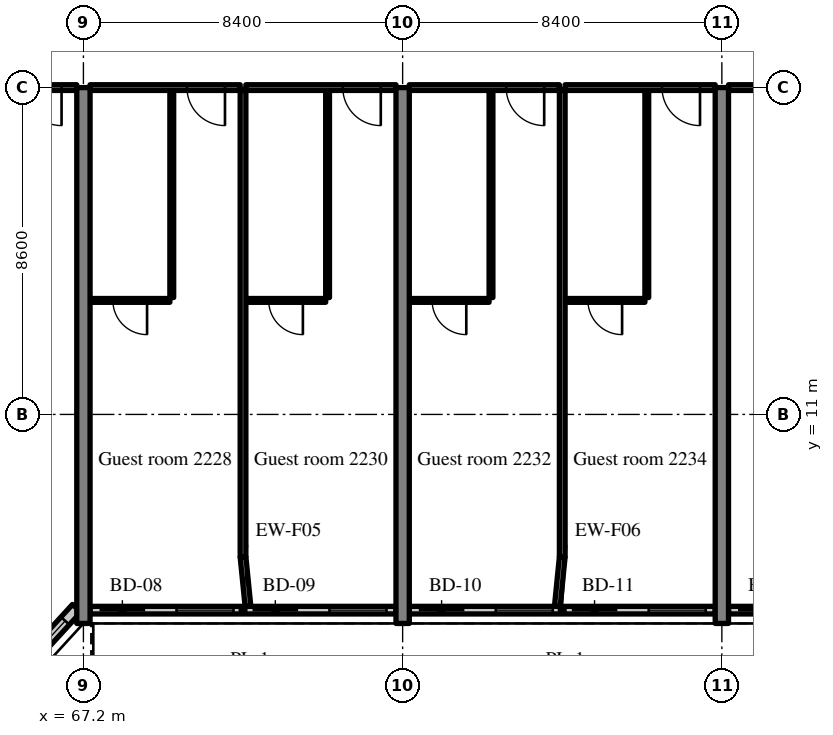
"""IFC4 building model, lengths in metres.
Left out: names, types, materials, properties, quantities, classifications, styles, units other than length and angle.
Written with IfcOpenShell. Run it as: python <this file> out.ifc"""

import sys

from ifc_helpers import new_model, si_unit, direction, frame, frame_2d, origin, place, context, subcontext, project, spatial, rectangle, extrude, source, transform, mapped, element, fill, save


model = new_model("IFC4")
c1 = context("Model", 3, precision=1e-05, world=origin(), true_north=direction((0.0, 1.0)))
c2 = subcontext(c1, "Body", "Model", "MODEL_VIEW")
j1 = project(units=[si_unit("LENGTHUNIT", "METRE"), si_unit("PLANEANGLEUNIT", "RADIAN")], contexts=[c1])
p1 = place(None, origin())
s1 = spatial("IfcSite", under=j1, at=p1, CompositionType="ELEMENT")
p2 = place(p1, origin())
s2 = spatial("IfcBuilding", under=s1, at=p2, CompositionType="ELEMENT")
p3 = place(p2, frame((0.0, 0.0, 95.2)))
s3 = spatial("IfcBuildingStorey", under=s2, at=p3, CompositionType="ELEMENT", Elevation=95.2)
m1 = source(origin(), c2, "Body", "SweptSolid", [
    extrude(rectangle(XDim=14.1, YDim=0.35, at=frame_2d((7.05, 0.0))), origin(), (0.0, 0.0, 1.0), 3.52),
])
for number, where, z_axis, x_axis in (
    (1, (67.2, 5.5, 0.0), (0.0, 0.0, 1.0), (0.0, 1.0, 0.0)),
    (2, (75.6, 5.5, 0.0), (0.0, 0.0, 1.0), (0.0, 1.0, 0.0)),
    (3, (84.0, 5.5, 0.0), (0.0, 0.0, 1.0), (0.0, 1.0, 0.0)),
):
    element("IfcWall", number, at=place(p3, frame(where, z_axis=z_axis, x_axis=x_axis)), inside=s3, PredefinedType="SHEAR", context=c2, shape_type="MappedRepresentation", body=[
        mapped(m1, transform((0.0, 0.0, 0.0), scale=1.0)),
    ])
m2 = source(origin(), c2, "Body", "SweptSolid", [
    extrude(rectangle(XDim=2.398, YDim=0.3, at=frame_2d((1.199, 0.0))), origin(), (0.0, 0.0, 1.0), 3.52),
])
p4 = place(p3, frame((65.404, 4.131, 0.0), z_axis=(0.0, 0.0, 1.0), x_axis=(0.675374189419, 0.737475222815, 0.0)))
e4 = element("IfcWall", 4, at=p4, inside=s3, PredefinedType="SOLIDWALL", context=c2, shape_type="MappedRepresentation", body=[
    mapped(m2, transform((0.0, 0.0, 0.0), scale=1.0)),
])
m3 = source(origin(), c2, "Body", "SweptSolid", [
    extrude(rectangle(XDim=1.5, YDim=2.0, at=frame_2d((0.75, 1.0))), frame((0.0, 0.16, 0.0), z_axis=(0.0, -1.0, 0.0), x_axis=(1.0, 0.0, 0.0)), (0.0, 0.0, 1.0), 0.32),
])
p5 = place(p4, frame((0.449, 0.0, 0.9)))
e5 = element("IfcOpeningElement", 5, at=p5, cuts=e4, PredefinedType="OPENING", context=c2, shape_type="MappedRepresentation", body=[
    mapped(m3, transform((0.0, 0.0, 0.0), scale=1.0)),
])
m4 = source(origin(), c2, "Body", "SweptSolid", [
    extrude(rectangle(XDim=8.05, YDim=0.2, at=frame_2d((4.025, 0.0))), origin(), (0.0, 0.0, 1.0), 2.82),
])
p6 = place(p3, frame((67.375, 5.85, 0.0), z_axis=(0.0, 0.0, 1.0), x_axis=(1.0, 0.0, 0.0)))
e6 = element("IfcWall", 6, at=p6, inside=s3, PredefinedType="SOLIDWALL", context=c2, shape_type="MappedRepresentation", body=[
    mapped(m4, transform((0.0, 0.0, 0.0), scale=1.0)),
])
m5 = source(origin(), c2, "Body", "SweptSolid", [
    extrude(rectangle(XDim=1.2, YDim=2.4, at=frame_2d((0.6, 1.2))), frame((0.0, 0.11, 0.0), z_axis=(0.0, -1.0, 0.0), x_axis=(1.0, 0.0, 0.0)), (0.0, 0.0, 1.0), 0.22),
])
p7 = place(p6, frame((0.25, 0.0, 0.0)))
e7 = element("IfcOpeningElement", 7, at=p7, cuts=e6, PredefinedType="OPENING", context=c2, shape_type="MappedRepresentation", body=[
    mapped(m5, transform((0.0, 0.0, 0.0), scale=1.0)),
])
m6 = source(origin(), c2, "Body", "SweptSolid", [
    extrude(rectangle(XDim=1.5, YDim=1.5, at=frame_2d((0.75, 0.75))), frame((0.0, 0.11, 0.0), z_axis=(0.0, -1.0, 0.0), x_axis=(1.0, 0.0, 0.0)), (0.0, 0.0, 1.0), 0.22),
])
p8 = place(p6, frame((2.275, 0.0, 0.9)))
e8 = element("IfcOpeningElement", 8, at=p8, cuts=e6, PredefinedType="OPENING", context=c2, shape_type="MappedRepresentation", body=[
    mapped(m6, transform((0.0, 0.0, 0.0), scale=1.0)),
])
p9 = place(p6, frame((4.275, 0.0, 0.0)))
e9 = element("IfcOpeningElement", 9, at=p9, cuts=e6, PredefinedType="OPENING", context=c2, shape_type="MappedRepresentation", body=[
    mapped(m5, transform((0.0, 0.0, 0.0), scale=1.0)),
])
p10 = place(p6, frame((6.3, 0.0, 0.9)))
e10 = element("IfcOpeningElement", 10, at=p10, cuts=e6, PredefinedType="OPENING", context=c2, shape_type="MappedRepresentation", body=[
    mapped(m6, transform((0.0, 0.0, 0.0), scale=1.0)),
])
p11 = place(p3, frame((75.775, 5.85, 0.0), z_axis=(0.0, 0.0, 1.0), x_axis=(1.0, 0.0, 0.0)))
e11 = element("IfcWall", 11, at=p11, inside=s3, PredefinedType="SOLIDWALL", context=c2, shape_type="MappedRepresentation", body=[
    mapped(m4, transform((0.0, 0.0, 0.0), scale=1.0)),
])
p12 = place(p11, frame((0.25, 0.0, 0.0)))
e12 = element("IfcOpeningElement", 12, at=p12, cuts=e11, PredefinedType="OPENING", context=c2, shape_type="MappedRepresentation", body=[
    mapped(m5, transform((0.0, 0.0, 0.0), scale=1.0)),
])
p13 = place(p11, frame((2.275, 0.0, 0.9)))
e13 = element("IfcOpeningElement", 13, at=p13, cuts=e11, PredefinedType="OPENING", context=c2, shape_type="MappedRepresentation", body=[
    mapped(m6, transform((0.0, 0.0, 0.0), scale=1.0)),
])
p14 = place(p11, frame((4.275, 0.0, 0.0)))
e14 = element("IfcOpeningElement", 14, at=p14, cuts=e11, PredefinedType="OPENING", context=c2, shape_type="MappedRepresentation", body=[
    mapped(m5, transform((0.0, 0.0, 0.0), scale=1.0)),
])
p15 = place(p11, frame((6.3, 0.0, 0.9)))
e15 = element("IfcOpeningElement", 15, at=p15, cuts=e11, PredefinedType="OPENING", context=c2, shape_type="MappedRepresentation", body=[
    mapped(m6, transform((0.0, 0.0, 0.0), scale=1.0)),
])
p16 = place(p3, frame((84.175, 5.85, 0.0), z_axis=(0.0, 0.0, 1.0), x_axis=(1.0, 0.0, 0.0)))
e16 = element("IfcWall", 16, at=p16, inside=s3, PredefinedType="SOLIDWALL", context=c2, shape_type="MappedRepresentation", body=[
    mapped(m4, transform((0.0, 0.0, 0.0), scale=1.0)),
])
p17 = place(p16, frame((0.25, 0.0, 0.0)))
e17 = element("IfcOpeningElement", 17, at=p17, cuts=e16, PredefinedType="OPENING", context=c2, shape_type="MappedRepresentation", body=[
    mapped(m5, transform((0.0, 0.0, 0.0), scale=1.0)),
])
p18 = place(p16, frame((2.275, 0.0, 0.9)))
e18 = element("IfcOpeningElement", 18, at=p18, cuts=e16, PredefinedType="OPENING", context=c2, shape_type="MappedRepresentation", body=[
    mapped(m6, transform((0.0, 0.0, 0.0), scale=1.0)),
])
p19 = place(p16, frame((4.275, 0.0, 0.0)))
e19 = element("IfcOpeningElement", 19, at=p19, cuts=e16, PredefinedType="OPENING", context=c2, shape_type="MappedRepresentation", body=[
    mapped(m5, transform((0.0, 0.0, 0.0), scale=1.0)),
])
p20 = place(p16, frame((6.3, 0.0, 0.9)))
e20 = element("IfcOpeningElement", 20, at=p20, cuts=e16, PredefinedType="OPENING", context=c2, shape_type="MappedRepresentation", body=[
    mapped(m6, transform((0.0, 0.0, 0.0), scale=1.0)),
])
m7 = source(origin(), c2, "Body", "SweptSolid", [
    extrude(rectangle(XDim=8.05, YDim=0.15, at=frame_2d((4.025, 0.0))), origin(), (0.0, 0.0, 1.0), 2.82),
])
p21 = place(p3, frame((58.975, 19.6, 0.0), z_axis=(0.0, 0.0, 1.0), x_axis=(1.0, 0.0, 0.0)))
e21 = element("IfcWall", 21, at=p21, inside=s3, PredefinedType="PARTITIONING", context=c2, shape_type="MappedRepresentation", body=[
    mapped(m7, transform((0.0, 0.0, 0.0), scale=1.0)),
])
m8 = source(origin(), c2, "Body", "SweptSolid", [
    extrude(rectangle(XDim=1.0, YDim=2.1, at=frame_2d((0.5, 1.05))), frame((0.0, 0.085, 0.0), z_axis=(0.0, -1.0, 0.0), x_axis=(1.0, 0.0, 0.0)), (0.0, 0.0, 1.0), 0.17),
])
p22 = place(p21, frame((6.65, 0.0, 0.0)))
e22 = element("IfcOpeningElement", 22, at=p22, cuts=e21, PredefinedType="OPENING", context=c2, shape_type="MappedRepresentation", body=[
    mapped(m8, transform((0.0, 0.0, 0.0), scale=1.0)),
])
m9 = source(origin(), c2, "Body", "SweptSolid", [
    extrude(rectangle(XDim=5.45, YDim=0.1, at=frame_2d((2.725, 0.0))), origin(), (0.0, 0.0, 1.0), 3.52),
])
p23 = place(p3, frame((69.525, 14.075, 0.0), z_axis=(0.0, 0.0, 1.0), x_axis=(0.0, 1.0, 0.0)))
e23 = element("IfcWall", 23, at=p23, inside=s3, PredefinedType="PARTITIONING", context=c2, shape_type="MappedRepresentation", body=[
    mapped(m9, transform((0.0, 0.0, 0.0), scale=1.0)),
])
m10 = source(origin(), c2, "Body", "SweptSolid", [
    extrude(rectangle(XDim=2.1, YDim=0.1, at=frame_2d((1.05, 0.0))), origin(), (0.0, 0.0, 1.0), 3.52),
])
p24 = place(p3, frame((67.375, 14.0, 0.0), z_axis=(0.0, 0.0, 1.0), x_axis=(1.0, 0.0, 0.0)))
e24 = element("IfcWall", 24, at=p24, inside=s3, PredefinedType="PARTITIONING", context=c2, shape_type="MappedRepresentation", body=[
    mapped(m10, transform((0.0, 0.0, 0.0), scale=1.0)),
])
m11 = source(origin(), c2, "Body", "SweptSolid", [
    extrude(rectangle(XDim=0.9, YDim=2.1, at=frame_2d((0.45, 1.05))), frame((0.0, 0.06, 0.0), z_axis=(0.0, -1.0, 0.0), x_axis=(1.0, 0.0, 0.0)), (0.0, 0.0, 1.0), 0.12),
])
p25 = place(p24, frame((0.6, 0.0, 0.0)))
e25 = element("IfcOpeningElement", 25, at=p25, cuts=e24, PredefinedType="OPENING", context=c2, shape_type="MappedRepresentation", body=[
    mapped(m11, transform((0.0, 0.0, 0.0), scale=1.0)),
])
m12 = source(origin(), c2, "Body", "SweptSolid", [
    extrude(rectangle(XDim=3.95, YDim=0.15, at=frame_2d((1.975, 0.0))), origin(), (0.0, 0.0, 1.0), 2.82),
])
p26 = place(p3, frame((67.375, 19.6, 0.0), z_axis=(0.0, 0.0, 1.0), x_axis=(1.0, 0.0, 0.0)))
e26 = element("IfcWall", 26, at=p26, inside=s3, PredefinedType="PARTITIONING", context=c2, shape_type="MappedRepresentation", body=[
    mapped(m12, transform((0.0, 0.0, 0.0), scale=1.0)),
])
p27 = place(p26, frame((2.55, 0.0, 0.0)))
e27 = element("IfcOpeningElement", 27, at=p27, cuts=e26, PredefinedType="OPENING", context=c2, shape_type="MappedRepresentation", body=[
    mapped(m8, transform((0.0, 0.0, 0.0), scale=1.0)),
])
p28 = place(p3, frame((73.625, 14.075, 0.0), z_axis=(0.0, 0.0, 1.0), x_axis=(0.0, 1.0, 0.0)))
e28 = element("IfcWall", 28, at=p28, inside=s3, PredefinedType="PARTITIONING", context=c2, shape_type="MappedRepresentation", body=[
    mapped(m9, transform((0.0, 0.0, 0.0), scale=1.0)),
])
m13 = source(origin(), c2, "Body", "SweptSolid", [
    extrude(rectangle(XDim=2.1, YDim=0.1, at=frame_2d((1.05, 0.0))), origin(), (0.0, 0.0, 1.0), 3.52),
])
p29 = place(p3, frame((71.475, 14.0, 0.0), z_axis=(0.0, 0.0, 1.0), x_axis=(1.0, 0.0, 0.0)))
e29 = element("IfcWall", 29, at=p29, inside=s3, PredefinedType="PARTITIONING", context=c2, shape_type="MappedRepresentation", body=[
    mapped(m13, transform((0.0, 0.0, 0.0), scale=1.0)),
])
p30 = place(p29, frame((0.6, 0.0, 0.0)))
e30 = element("IfcOpeningElement", 30, at=p30, cuts=e29, PredefinedType="OPENING", context=c2, shape_type="MappedRepresentation", body=[
    mapped(m11, transform((0.0, 0.0, 0.0), scale=1.0)),
])
p31 = place(p3, frame((71.475, 19.6, 0.0), z_axis=(0.0, 0.0, 1.0), x_axis=(1.0, 0.0, 0.0)))
e31 = element("IfcWall", 31, at=p31, inside=s3, PredefinedType="PARTITIONING", context=c2, shape_type="MappedRepresentation", body=[
    mapped(m12, transform((0.0, 0.0, 0.0), scale=1.0)),
])
p32 = place(p31, frame((2.55, 0.0, 0.0)))
e32 = element("IfcOpeningElement", 32, at=p32, cuts=e31, PredefinedType="OPENING", context=c2, shape_type="MappedRepresentation", body=[
    mapped(m8, transform((0.0, 0.0, 0.0), scale=1.0)),
])
m14 = source(origin(), c2, "Body", "SweptSolid", [
    extrude(rectangle(XDim=12.275, YDim=0.15, at=frame_2d((6.137, 0.0))), origin(), (0.0, 0.0, 1.0), 3.52),
])
p33 = place(p3, frame((71.4, 7.25, 0.0), z_axis=(0.0, 0.0, 1.0), x_axis=(0.0, 1.0, 0.0)))
e33 = element("IfcWall", 33, at=p33, inside=s3, PredefinedType="PARTITIONING", context=c2, shape_type="MappedRepresentation", body=[
    mapped(m14, transform((0.0, 0.0, 0.0), scale=1.0)),
])
p34 = place(p3, frame((77.925, 14.075, 0.0), z_axis=(0.0, 0.0, 1.0), x_axis=(0.0, 1.0, 0.0)))
e34 = element("IfcWall", 34, at=p34, inside=s3, PredefinedType="PARTITIONING", context=c2, shape_type="MappedRepresentation", body=[
    mapped(m9, transform((0.0, 0.0, 0.0), scale=1.0)),
])
p35 = place(p3, frame((75.775, 14.0, 0.0), z_axis=(0.0, 0.0, 1.0), x_axis=(1.0, 0.0, 0.0)))
e35 = element("IfcWall", 35, at=p35, inside=s3, PredefinedType="PARTITIONING", context=c2, shape_type="MappedRepresentation", body=[
    mapped(m10, transform((0.0, 0.0, 0.0), scale=1.0)),
])
p36 = place(p35, frame((0.6, 0.0, 0.0)))
e36 = element("IfcOpeningElement", 36, at=p36, cuts=e35, PredefinedType="OPENING", context=c2, shape_type="MappedRepresentation", body=[
    mapped(m11, transform((0.0, 0.0, 0.0), scale=1.0)),
])
m15 = source(origin(), c2, "Body", "SweptSolid", [
    extrude(rectangle(XDim=3.95, YDim=0.15, at=frame_2d((1.975, 0.0))), origin(), (0.0, 0.0, 1.0), 2.82),
])
p37 = place(p3, frame((75.775, 19.6, 0.0), z_axis=(0.0, 0.0, 1.0), x_axis=(1.0, 0.0, 0.0)))
e37 = element("IfcWall", 37, at=p37, inside=s3, PredefinedType="PARTITIONING", context=c2, shape_type="MappedRepresentation", body=[
    mapped(m15, transform((0.0, 0.0, 0.0), scale=1.0)),
])
p38 = place(p37, frame((2.55, 0.0, 0.0)))
e38 = element("IfcOpeningElement", 38, at=p38, cuts=e37, PredefinedType="OPENING", context=c2, shape_type="MappedRepresentation", body=[
    mapped(m8, transform((0.0, 0.0, 0.0), scale=1.0)),
])
p39 = place(p3, frame((82.025, 14.075, 0.0), z_axis=(0.0, 0.0, 1.0), x_axis=(0.0, 1.0, 0.0)))
e39 = element("IfcWall", 39, at=p39, inside=s3, PredefinedType="PARTITIONING", context=c2, shape_type="MappedRepresentation", body=[
    mapped(m9, transform((0.0, 0.0, 0.0), scale=1.0)),
])
p40 = place(p3, frame((79.875, 14.0, 0.0), z_axis=(0.0, 0.0, 1.0), x_axis=(1.0, 0.0, 0.0)))
e40 = element("IfcWall", 40, at=p40, inside=s3, PredefinedType="PARTITIONING", context=c2, shape_type="MappedRepresentation", body=[
    mapped(m10, transform((0.0, 0.0, 0.0), scale=1.0)),
])
p41 = place(p40, frame((0.6, 0.0, 0.0)))
e41 = element("IfcOpeningElement", 41, at=p41, cuts=e40, PredefinedType="OPENING", context=c2, shape_type="MappedRepresentation", body=[
    mapped(m11, transform((0.0, 0.0, 0.0), scale=1.0)),
])
p42 = place(p3, frame((79.875, 19.6, 0.0), z_axis=(0.0, 0.0, 1.0), x_axis=(1.0, 0.0, 0.0)))
e42 = element("IfcWall", 42, at=p42, inside=s3, PredefinedType="PARTITIONING", context=c2, shape_type="MappedRepresentation", body=[
    mapped(m12, transform((0.0, 0.0, 0.0), scale=1.0)),
])
p43 = place(p42, frame((2.55, 0.0, 0.0)))
e43 = element("IfcOpeningElement", 43, at=p43, cuts=e42, PredefinedType="OPENING", context=c2, shape_type="MappedRepresentation", body=[
    mapped(m8, transform((0.0, 0.0, 0.0), scale=1.0)),
])
p44 = place(p3, frame((79.8, 7.25, 0.0), z_axis=(0.0, 0.0, 1.0), x_axis=(0.0, 1.0, 0.0)))
e44 = element("IfcWall", 44, at=p44, inside=s3, PredefinedType="PARTITIONING", context=c2, shape_type="MappedRepresentation", body=[
    mapped(m14, transform((0.0, 0.0, 0.0), scale=1.0)),
])
p45 = place(p3, frame((84.175, 19.6, 0.0), z_axis=(0.0, 0.0, 1.0), x_axis=(1.0, 0.0, 0.0)))
e45 = element("IfcWall", 45, at=p45, inside=s3, PredefinedType="PARTITIONING", context=c2, shape_type="MappedRepresentation", body=[
    mapped(m12, transform((0.0, 0.0, 0.0), scale=1.0)),
])
p46 = place(p45, frame((1.475, 0.0, 0.0)))
e46 = element("IfcOpeningElement", 46, at=p46, cuts=e45, PredefinedType="OPENING", context=c2, shape_type="MappedRepresentation", body=[
    mapped(m8, transform((0.0, 0.0, 0.0), scale=1.0)),
])
m16 = source(origin(), c2, "Body", "SweptSolid", [
    extrude(rectangle(XDim=1.307, YDim=0.15, at=frame_2d((0.653, 0.0))), origin(), (0.0, 0.0, 1.0), 3.52),
])
for number, where, z_axis, x_axis in (
    (47, (71.53, 5.95, 0.0), (0.0, 0.0, 1.0), (-0.1, 0.995, 0.0)),
    (48, (79.67, 5.95, 0.0), (0.0, 0.0, 1.0), (0.1, 0.995, 0.0)),
):
    element("IfcWall", number, at=place(p3, frame(where, z_axis=z_axis, x_axis=x_axis)), inside=s3, PredefinedType="PARTITIONING", context=c2, shape_type="MappedRepresentation", body=[
        mapped(m16, transform((0.0, 0.0, 0.0), scale=1.0)),
    ])
m17 = source(origin(), c2, "Body", "SweptSolid", [
    extrude(rectangle(XDim=1.5, YDim=2.0, at=frame_2d((0.75, 1.0))), frame((0.0, 0.03, 0.0), z_axis=(0.0, -1.0, 0.0), x_axis=(1.0, 0.0, 0.0)), (0.0, 0.0, 1.0), 0.06),
])
p47 = place(p5, origin())
e49 = element("IfcWindow", 49, at=p47, inside=s3, PartitioningType="SINGLE_PANEL", PredefinedType="WINDOW", context=c2, shape_type="MappedRepresentation", body=[
    mapped(m17, transform((0.0, 0.0, 0.0), scale=1.0)),
])
fill(e5, e49)
m18 = source(origin(), c2, "Body", "SweptSolid", [
    extrude(rectangle(XDim=1.2, YDim=2.4, at=frame_2d((0.6, 1.2))), frame((0.0, 0.025, 0.0), z_axis=(0.0, -1.0, 0.0), x_axis=(1.0, 0.0, 0.0)), (0.0, 0.0, 1.0), 0.05),
])
p48 = place(p7, origin())
e50 = element("IfcDoor", 50, at=p48, inside=s3, OperationType="SLIDING_TO_RIGHT", PredefinedType="DOOR", context=c2, shape_type="MappedRepresentation", body=[
    mapped(m18, transform((0.0, 0.0, 0.0), scale=1.0)),
])
fill(e7, e50)
m19 = source(origin(), c2, "Body", "SweptSolid", [
    extrude(rectangle(XDim=1.5, YDim=1.5, at=frame_2d((0.75, 0.75))), frame((0.0, 0.03, 0.0), z_axis=(0.0, -1.0, 0.0), x_axis=(1.0, 0.0, 0.0)), (0.0, 0.0, 1.0), 0.06),
])
p49 = place(p8, origin())
e51 = element("IfcWindow", 51, at=p49, inside=s3, PartitioningType="SINGLE_PANEL", PredefinedType="WINDOW", context=c2, shape_type="MappedRepresentation", body=[
    mapped(m19, transform((0.0, 0.0, 0.0), scale=1.0)),
])
fill(e8, e51)
p50 = place(p9, origin())
e52 = element("IfcDoor", 52, at=p50, inside=s3, OperationType="SLIDING_TO_LEFT", PredefinedType="DOOR", context=c2, shape_type="MappedRepresentation", body=[
    mapped(m18, transform((0.0, 0.0, 0.0), scale=1.0)),
])
fill(e9, e52)
p51 = place(p10, origin())
e53 = element("IfcWindow", 53, at=p51, inside=s3, PartitioningType="SINGLE_PANEL", PredefinedType="WINDOW", context=c2, shape_type="MappedRepresentation", body=[
    mapped(m19, transform((0.0, 0.0, 0.0), scale=1.0)),
])
fill(e10, e53)
p52 = place(p12, origin())
e54 = element("IfcDoor", 54, at=p52, inside=s3, OperationType="SLIDING_TO_RIGHT", PredefinedType="DOOR", context=c2, shape_type="MappedRepresentation", body=[
    mapped(m18, transform((0.0, 0.0, 0.0), scale=1.0)),
])
fill(e12, e54)
p53 = place(p13, origin())
e55 = element("IfcWindow", 55, at=p53, inside=s3, PartitioningType="SINGLE_PANEL", PredefinedType="WINDOW", context=c2, shape_type="MappedRepresentation", body=[
    mapped(m19, transform((0.0, 0.0, 0.0), scale=1.0)),
])
fill(e13, e55)
p54 = place(p14, origin())
e56 = element("IfcDoor", 56, at=p54, inside=s3, OperationType="SLIDING_TO_LEFT", PredefinedType="DOOR", context=c2, shape_type="MappedRepresentation", body=[
    mapped(m18, transform((0.0, 0.0, 0.0), scale=1.0)),
])
fill(e14, e56)
p55 = place(p15, origin())
e57 = element("IfcWindow", 57, at=p55, inside=s3, PartitioningType="SINGLE_PANEL", PredefinedType="WINDOW", context=c2, shape_type="MappedRepresentation", body=[
    mapped(m19, transform((0.0, 0.0, 0.0), scale=1.0)),
])
fill(e15, e57)
p56 = place(p17, origin())
e58 = element("IfcDoor", 58, at=p56, inside=s3, OperationType="SLIDING_TO_RIGHT", PredefinedType="DOOR", context=c2, shape_type="MappedRepresentation", body=[
    mapped(m18, transform((0.0, 0.0, 0.0), scale=1.0)),
])
fill(e17, e58)
m20 = source(origin(), c2, "Body", "SweptSolid", [
    extrude(rectangle(XDim=1.0, YDim=2.1, at=frame_2d((0.5, 1.05))), frame((0.0, 0.025, 0.0), z_axis=(0.0, -1.0, 0.0), x_axis=(1.0, 0.0, 0.0)), (0.0, 0.0, 1.0), 0.05),
])
p57 = place(p22, origin())
e59 = element("IfcDoor", 59, at=p57, inside=s3, OperationType="SINGLE_SWING_RIGHT", PredefinedType="DOOR", context=c2, shape_type="MappedRepresentation", body=[
    mapped(m20, transform((0.0, 0.0, 0.0), scale=1.0)),
])
fill(e22, e59)
m21 = source(origin(), c2, "Body", "SweptSolid", [
    extrude(rectangle(XDim=0.9, YDim=2.1, at=frame_2d((0.45, 1.05))), frame((0.0, 0.025, 0.0), z_axis=(0.0, -1.0, 0.0), x_axis=(1.0, 0.0, 0.0)), (0.0, 0.0, 1.0), 0.05),
])
p58 = place(p25, origin())
e60 = element("IfcDoor", 60, at=p58, inside=s3, OperationType="SINGLE_SWING_RIGHT", PredefinedType="DOOR", context=c2, shape_type="MappedRepresentation", body=[
    mapped(m21, transform((0.0, 0.0, 0.0), scale=1.0)),
])
fill(e25, e60)
p59 = place(p27, origin())
e61 = element("IfcDoor", 61, at=p59, inside=s3, OperationType="SINGLE_SWING_RIGHT", PredefinedType="DOOR", context=c2, shape_type="MappedRepresentation", body=[
    mapped(m20, transform((0.0, 0.0, 0.0), scale=1.0)),
])
fill(e27, e61)
p60 = place(p30, origin())
e62 = element("IfcDoor", 62, at=p60, inside=s3, OperationType="SINGLE_SWING_RIGHT", PredefinedType="DOOR", context=c2, shape_type="MappedRepresentation", body=[
    mapped(m21, transform((0.0, 0.0, 0.0), scale=1.0)),
])
fill(e30, e62)
p61 = place(p32, origin())
e63 = element("IfcDoor", 63, at=p61, inside=s3, OperationType="SINGLE_SWING_RIGHT", PredefinedType="DOOR", context=c2, shape_type="MappedRepresentation", body=[
    mapped(m20, transform((0.0, 0.0, 0.0), scale=1.0)),
])
fill(e32, e63)
p62 = place(p36, origin())
e64 = element("IfcDoor", 64, at=p62, inside=s3, OperationType="SINGLE_SWING_RIGHT", PredefinedType="DOOR", context=c2, shape_type="MappedRepresentation", body=[
    mapped(m21, transform((0.0, 0.0, 0.0), scale=1.0)),
])
fill(e36, e64)
p63 = place(p38, origin())
e65 = element("IfcDoor", 65, at=p63, inside=s3, OperationType="SINGLE_SWING_RIGHT", PredefinedType="DOOR", context=c2, shape_type="MappedRepresentation", body=[
    mapped(m20, transform((0.0, 0.0, 0.0), scale=1.0)),
])
fill(e38, e65)
p64 = place(p41, origin())
e66 = element("IfcDoor", 66, at=p64, inside=s3, OperationType="SINGLE_SWING_RIGHT", PredefinedType="DOOR", context=c2, shape_type="MappedRepresentation", body=[
    mapped(m21, transform((0.0, 0.0, 0.0), scale=1.0)),
])
fill(e41, e66)
p65 = place(p43, origin())
e67 = element("IfcDoor", 67, at=p65, inside=s3, OperationType="SINGLE_SWING_RIGHT", PredefinedType="DOOR", context=c2, shape_type="MappedRepresentation", body=[
    mapped(m20, transform((0.0, 0.0, 0.0), scale=1.0)),
])
fill(e43, e67)
save(model, sys.argv[1])
